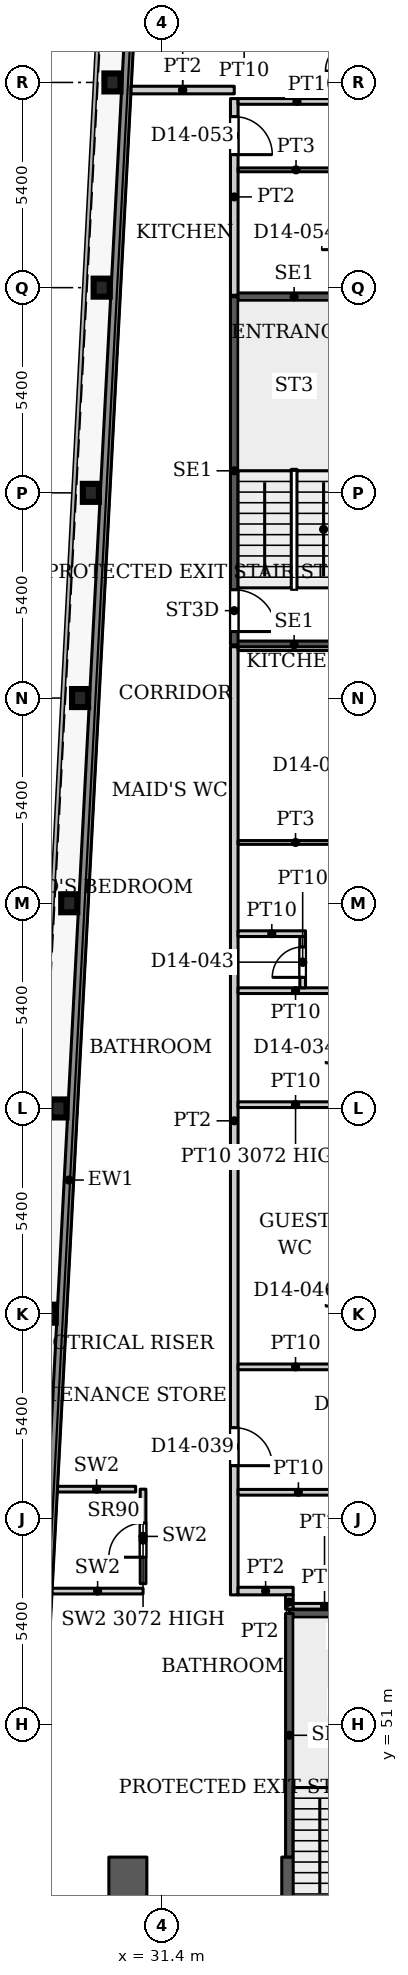
"""IFC4 building model, lengths in metres.
Left out: names, types, materials, properties, quantities, classifications, styles, units other than length and angle.
Written with IfcOpenShell. Run it as: python <this file> out.ifc"""

import sys

from ifc_helpers import new_model, si_unit, direction, frame, frame_2d, origin, origin_2d, place, context, subcontext, project, spatial, rectangle, i_section, extrude, source, transform, mapped, element, fill, save


model = new_model("IFC4")
c1 = context("Model", 3, precision=1e-05, world=origin(), true_north=direction((0.0, 1.0)))
c2 = subcontext(c1, "Body", "Model", "MODEL_VIEW")
j1 = project(units=[si_unit("LENGTHUNIT", "METRE"), si_unit("PLANEANGLEUNIT", "RADIAN")], contexts=[c1])
p1 = place(None, origin())
s1 = spatial("IfcSite", under=j1, at=p1, CompositionType="ELEMENT")
p2 = place(p1, origin())
s2 = spatial("IfcBuilding", under=s1, at=p2, CompositionType="ELEMENT")
p3 = place(p2, frame((0.0, 0.0, 65.6)))
s3 = spatial("IfcBuildingStorey", under=s2, at=p3, CompositionType="ELEMENT", Elevation=65.6)
for number, where, z_axis, x_axis in (
    (1, (28.39, 61.8, 0.0), (0.0, 0.0, 1.0), (1.0, 0.0, 0.0)),
    (2, (28.674, 67.2, 0.0), (0.0, 0.0, 1.0), (1.0, 0.0, 0.0)),
    (3, (28.958, 72.6, 0.0), (0.0, 0.0, 1.0), (1.0, 0.0, 0.0)),
    (4, (29.243, 78.0, 0.0), (0.0, 0.0, 1.0), (1.0, 0.0, 0.0)),
    (5, (29.527, 83.4, 0.0), (0.0, 0.0, 1.0), (1.0, 0.0, 0.0)),
    (6, (29.811, 88.8, 0.0), (0.0, 0.0, 1.0), (1.0, 0.0, 0.0)),
    (7, (30.095, 94.2, 0.0), (0.0, 0.0, 1.0), (1.0, 0.0, 0.0)),
):
    element("IfcColumn", number, at=place(p3, frame(where, z_axis=z_axis, x_axis=x_axis)), inside=s3, PredefinedType="COLUMN", context=c2, shape_type="SweptSolid", body=[
        extrude(i_section(OverallWidth=0.424, OverallDepth=0.474, WebThickness=0.048, FlangeThickness=0.077, FilletRadius=0.014, at=origin_2d()), origin(), (0.0, 0.0, 1.0), 3.9),
    ])
p4 = place(p3, frame((34.75, 29.05, 0.0), z_axis=(0.0, 0.0, 1.0), x_axis=(0.0, 1.0, 0.0)))
e8 = element("IfcWall", 8, at=p4, inside=s3, PredefinedType="SHEAR", context=c2, shape_type="SweptSolid", body=[
    extrude(rectangle(XDim=18.45, YDim=0.4, at=frame_2d((9.225, 0.0))), origin(), (0.0, 0.0, 1.0), 3.9),
])
p5 = place(p4, frame((8.025, 0.0, 0.0)))
e9 = element("IfcOpeningElement", 9, at=p5, cuts=e8, PredefinedType="OPENING", context=c2, shape_type="SweptSolid", body=[
    extrude(rectangle(XDim=1.1, YDim=2.2, at=frame_2d((0.55, 1.1))), frame((0.0, 0.21, 0.0), z_axis=(0.0, -1.0, 0.0), x_axis=(1.0, 0.0, 0.0)), (0.0, 0.0, 1.0), 0.42),
])
p6 = place(p4, frame((10.875, 0.0, 0.0)))
e10 = element("IfcOpeningElement", 10, at=p6, cuts=e8, PredefinedType="OPENING", context=c2, shape_type="SweptSolid", body=[
    extrude(rectangle(XDim=1.1, YDim=2.2, at=frame_2d((0.55, 1.1))), frame((0.0, 0.21, 0.0), z_axis=(0.0, -1.0, 0.0), x_axis=(1.0, 0.0, 0.0)), (0.0, 0.0, 1.0), 0.42),
])
p7 = place(p4, frame((13.725, 0.0, 0.0)))
e11 = element("IfcOpeningElement", 11, at=p7, cuts=e8, PredefinedType="OPENING", context=c2, shape_type="SweptSolid", body=[
    extrude(rectangle(XDim=1.1, YDim=2.2, at=frame_2d((0.55, 1.1))), frame((0.0, 0.21, 0.0), z_axis=(0.0, -1.0, 0.0), x_axis=(1.0, 0.0, 0.0)), (0.0, 0.0, 1.0), 0.42),
])
p8 = place(p4, frame((15.95, 0.0, 0.0)))
e12 = element("IfcOpeningElement", 12, at=p8, cuts=e8, PredefinedType="OPENING", context=c2, shape_type="SweptSolid", body=[
    extrude(rectangle(XDim=1.1, YDim=2.2, at=frame_2d((0.55, 1.1))), frame((0.0, 0.21, 0.0), z_axis=(0.0, -1.0, 0.0), x_axis=(1.0, 0.0, 0.0)), (0.0, 0.0, 1.0), 0.42),
])
p9 = place(p3, frame((30.5, 29.05, 0.0), z_axis=(0.0, 0.0, 1.0), x_axis=(0.0, 1.0, 0.0)))
e13 = element("IfcWall", 13, at=p9, inside=s3, PredefinedType="SHEAR", context=c2, shape_type="SweptSolid", body=[
    extrude(rectangle(XDim=18.45, YDim=1.0, at=frame_2d((9.225, 0.0))), origin(), (0.0, 0.0, 1.0), 3.9),
])
p10 = place(p9, frame((1.147, 0.0, 0.0)))
e14 = element("IfcOpeningElement", 14, at=p10, cuts=e13, PredefinedType="OPENING", context=c2, shape_type="SweptSolid", body=[
    extrude(rectangle(XDim=0.9, YDim=2.2, at=frame_2d((0.45, 1.1))), frame((0.0, 0.51, 0.0), z_axis=(0.0, -1.0, 0.0), x_axis=(1.0, 0.0, 0.0)), (0.0, 0.0, 1.0), 1.02),
])
p11 = place(p9, frame((7.925, 0.0, 0.0)))
e15 = element("IfcOpeningElement", 15, at=p11, cuts=e13, PredefinedType="OPENING", context=c2, shape_type="SweptSolid", body=[
    extrude(rectangle(XDim=0.9, YDim=2.2, at=frame_2d((0.45, 1.1))), frame((0.0, 0.51, 0.0), z_axis=(0.0, -1.0, 0.0), x_axis=(1.0, 0.0, 0.0)), (0.0, 0.0, 1.0), 1.02),
])
p12 = place(p3, frame((27.195, 31.969, 0.0), z_axis=(0.0, 0.0, 1.0), x_axis=(0.052554995867, 0.998618031286, 0.0)))
e16 = element("IfcWall", 16, at=p12, inside=s3, PredefinedType="SOLIDWALL", context=c2, shape_type="SweptSolid", body=[
    extrude(rectangle(XDim=66.787, YDim=0.25, at=frame_2d((33.394, 0.0))), origin(), (0.0, 0.0, 1.0), 3.75),
])
p13 = place(p3, frame((34.75, 53.91, 0.0), z_axis=(0.0, 0.0, 1.0), x_axis=(1.0, 0.0, 0.0)))
e17 = element("IfcWall", 17, at=p13, inside=s3, PredefinedType="SHEAR", context=c2, shape_type="SweptSolid", body=[
    extrude(rectangle(XDim=3.15, YDim=0.2, at=frame_2d((1.575, 0.0))), origin(), (0.0, 0.0, 1.0), 3.9),
])
p14 = place(p3, frame((34.75, 47.5, 0.0), z_axis=(0.0, 0.0, 1.0), x_axis=(0.0, 1.0, 0.0)))
e18 = element("IfcWall", 18, at=p14, inside=s3, PredefinedType="SHEAR", context=c2, shape_type="SweptSolid", body=[
    extrude(rectangle(XDim=6.41, YDim=0.2, at=frame_2d((3.205, 0.0))), origin(), (0.0, 0.0, 1.0), 3.9),
])
for number, where, z_axis, x_axis in (
    (19, (33.3, 79.4, 0.0), (0.0, 0.0, 1.0), (1.0, 0.0, 0.0)),
    (20, (33.3, 88.56, 0.0), (0.0, 0.0, 1.0), (1.0, 0.0, 0.0)),
):
    element("IfcWall", number, at=place(p3, frame(where, z_axis=z_axis, x_axis=x_axis)), inside=s3, PredefinedType="SHEAR", context=c2, shape_type="SweptSolid", body=[
        extrude(rectangle(XDim=3.15, YDim=0.2, at=frame_2d((1.575, 0.0))), origin(), (0.0, 0.0, 1.0), 3.9),
    ])
p15 = place(p3, frame((33.3, 79.4, 0.0), z_axis=(0.0, 0.0, 1.0), x_axis=(0.0, 1.0, 0.0)))
e21 = element("IfcWall", 21, at=p15, inside=s3, PredefinedType="SHEAR", context=c2, shape_type="SweptSolid", body=[
    extrude(rectangle(XDim=9.16, YDim=0.2, at=frame_2d((4.58, 0.0))), origin(), (0.0, 0.0, 1.0), 3.9),
])
p16 = place(p15, frame((0.35, 0.0, 0.0)))
e22 = element("IfcOpeningElement", 22, at=p16, cuts=e21, PredefinedType="OPENING", context=c2, shape_type="SweptSolid", body=[
    extrude(rectangle(XDim=1.1, YDim=2.2, at=frame_2d((0.55, 1.1))), frame((0.0, 0.11, 0.0), z_axis=(0.0, -1.0, 0.0), x_axis=(1.0, 0.0, 0.0)), (0.0, 0.0, 1.0), 0.22),
])
p17 = place(p3, frame((28.508, 54.5, 0.0), z_axis=(0.0, 0.0, 1.0), x_axis=(1.0, 0.0, 0.0)))
e23 = element("IfcWall", 23, at=p17, inside=s3, PredefinedType="PARTITIONING", context=c2, shape_type="SweptSolid", body=[
    extrude(rectangle(XDim=2.392, YDim=0.15, at=frame_2d((1.196, 0.0))), origin(), (0.0, 0.0, 1.0), 3.9),
])
p18 = place(p3, frame((30.9, 54.695, 0.0), z_axis=(0.0, 0.0, 1.0), x_axis=(0.0, 1.0, 0.0)))
e24 = element("IfcWall", 24, at=p18, inside=s3, PredefinedType="PARTITIONING", context=c2, shape_type="SweptSolid", body=[
    extrude(rectangle(XDim=2.487, YDim=0.15, at=frame_2d((1.243, 0.0))), origin(), (0.0, 0.0, 1.0), 3.072),
])
p19 = place(p18, frame((0.696, 0.0, 0.0)))
e25 = element("IfcOpeningElement", 25, at=p19, cuts=e24, PredefinedType="OPENING", context=c2, shape_type="SweptSolid", body=[
    extrude(rectangle(XDim=0.9, YDim=2.2, at=frame_2d((0.45, 1.1))), frame((0.0, 0.085, 0.0), z_axis=(0.0, -1.0, 0.0), x_axis=(1.0, 0.0, 0.0)), (0.0, 0.0, 1.0), 0.17),
])
p20 = place(p3, frame((28.649, 57.182, 0.0), z_axis=(0.0, 0.0, 1.0), x_axis=(1.0, 0.0, 0.0)))
e26 = element("IfcWall", 26, at=p20, inside=s3, PredefinedType="PARTITIONING", context=c2, shape_type="SweptSolid", body=[
    extrude(rectangle(XDim=2.056, YDim=0.15, at=frame_2d((1.028, 0.0))), origin(), (0.0, 0.0, 1.0), 3.9),
])
p21 = place(p3, frame((30.585, 94.0, 0.0), z_axis=(0.0, 0.0, 1.0), x_axis=(1.0, 0.0, 0.0)))
e27 = element("IfcWall", 27, at=p21, inside=s3, PredefinedType="PARTITIONING", context=c2, shape_type="SweptSolid", body=[
    extrude(rectangle(XDim=2.715, YDim=0.2, at=frame_2d((1.358, 0.0))), origin(), (0.0, 0.0, 1.0), 3.147),
])
p22 = place(p3, frame((33.3, 54.4, 0.0), z_axis=(0.0, 0.0, 1.0), x_axis=(0.0, 1.0, 0.0)))
e28 = element("IfcWall", 28, at=p22, inside=s3, PredefinedType="PARTITIONING", context=c2, shape_type="SweptSolid", body=[
    extrude(rectangle(XDim=24.95, YDim=0.2, at=frame_2d((12.475, 0.0))), origin(), (0.0, 0.0, 1.0), 3.6),
])
p23 = place(p22, frame((3.4, 0.0, 0.0)))
e29 = element("IfcOpeningElement", 29, at=p23, cuts=e28, PredefinedType="OPENING", context=c2, shape_type="SweptSolid", body=[
    extrude(rectangle(XDim=1.0, YDim=2.1, at=frame_2d((0.5, 1.05))), frame((0.0, 0.11, 0.0), z_axis=(0.0, -1.0, 0.0), x_axis=(1.0, 0.0, 0.0)), (0.0, 0.0, 1.0), 0.22),
])
p24 = place(p3, frame((33.3, 88.6, 0.0), z_axis=(0.0, 0.0, 1.0), x_axis=(0.0, 1.0, 0.0)))
e30 = element("IfcWall", 30, at=p24, inside=s3, PredefinedType="PARTITIONING", context=c2, shape_type="SweptSolid", body=[
    extrude(rectangle(XDim=5.175, YDim=0.2, at=frame_2d((2.587, 0.0))), origin(), (0.0, 0.0, 1.0), 3.6),
])
p25 = place(p24, frame((3.7, 0.0, 0.0)))
e31 = element("IfcOpeningElement", 31, at=p25, cuts=e30, PredefinedType="OPENING", context=c2, shape_type="SweptSolid", body=[
    extrude(rectangle(XDim=1.0, YDim=2.1, at=frame_2d((0.5, 1.05))), frame((0.0, 0.11, 0.0), z_axis=(0.0, -1.0, 0.0), x_axis=(1.0, 0.0, 0.0)), (0.0, 0.0, 1.0), 0.22),
])
p26 = place(p3, frame((33.4, 54.5, 0.0), z_axis=(0.0, 0.0, 1.0), x_axis=(1.0, 0.0, 0.0)))
e32 = element("IfcWall", 32, at=p26, inside=s3, PredefinedType="PARTITIONING", context=c2, shape_type="SweptSolid", body=[
    extrude(rectangle(XDim=1.45, YDim=0.2, at=frame_2d((0.725, 0.0))), origin(), (0.0, 0.0, 1.0), 3.6),
])
p27 = place(p3, frame((33.4, 57.1, 0.0), z_axis=(0.0, 0.0, 1.0), x_axis=(1.0, 0.0, 0.0)))
e33 = element("IfcWall", 33, at=p27, inside=s3, PredefinedType="PARTITIONING", context=c2, shape_type="SweptSolid", body=[
    extrude(rectangle(XDim=3.175, YDim=0.15, at=frame_2d((1.587, 0.0))), origin(), (0.0, 0.0, 1.0), 3.6),
])
p28 = place(p3, frame((33.4, 60.4, 0.0), z_axis=(0.0, 0.0, 1.0), x_axis=(1.0, 0.0, 0.0)))
e34 = element("IfcWall", 34, at=p28, inside=s3, PredefinedType="PARTITIONING", context=c2, shape_type="SweptSolid", body=[
    extrude(rectangle(XDim=3.025, YDim=0.15, at=frame_2d((1.513, 0.0))), origin(), (0.0, 0.0, 1.0), 3.6),
])
p29 = place(p3, frame((33.4, 67.3, 0.0), z_axis=(0.0, 0.0, 1.0), x_axis=(1.0, 0.0, 0.0)))
e35 = element("IfcWall", 35, at=p29, inside=s3, PredefinedType="PARTITIONING", context=c2, shape_type="SweptSolid", body=[
    extrude(rectangle(XDim=3.025, YDim=0.15, at=frame_2d((1.513, 0.0))), origin(), (0.0, 0.0, 1.0), 3.072),
])
p30 = place(p3, frame((33.4, 70.3, 0.0), z_axis=(0.0, 0.0, 1.0), x_axis=(1.0, 0.0, 0.0)))
e36 = element("IfcWall", 36, at=p30, inside=s3, PredefinedType="PARTITIONING", context=c2, shape_type="SweptSolid", body=[
    extrude(rectangle(XDim=3.025, YDim=0.15, at=frame_2d((1.513, 0.0))), origin(), (0.0, 0.0, 1.0), 3.6),
])
p31 = place(p3, frame((33.4, 71.8, 0.0), z_axis=(0.0, 0.0, 1.0), x_axis=(1.0, 0.0, 0.0)))
e37 = element("IfcWall", 37, at=p31, inside=s3, PredefinedType="PARTITIONING", context=c2, shape_type="SweptSolid", body=[
    extrude(rectangle(XDim=1.775, YDim=0.15, at=frame_2d((0.888, 0.0))), origin(), (0.0, 0.0, 1.0), 3.6),
])
p32 = place(p3, frame((33.4, 74.2, 0.0), z_axis=(0.0, 0.0, 1.0), x_axis=(1.0, 0.0, 0.0)))
e38 = element("IfcWall", 38, at=p32, inside=s3, PredefinedType="PARTITIONING", context=c2, shape_type="SweptSolid", body=[
    extrude(rectangle(XDim=3.025, YDim=0.1, at=frame_2d((1.513, 0.0))), origin(), (0.0, 0.0, 1.0), 3.6),
])
p33 = place(p3, frame((33.4, 79.3, 0.0), z_axis=(0.0, 0.0, 1.0), x_axis=(1.0, 0.0, 0.0)))
e39 = element("IfcWall", 39, at=p33, inside=s3, PredefinedType="PARTITIONING", context=c2, shape_type="SweptSolid", body=[
    extrude(rectangle(XDim=12.5, YDim=0.1, at=frame_2d((6.25, 0.0))), origin(), (0.0, 0.0, 1.0), 3.6),
])
p34 = place(p33, frame((3.355, 0.0, 0.0)))
e40 = element("IfcOpeningElement", 40, at=p34, cuts=e39, PredefinedType="OPENING", context=c2, shape_type="SweptSolid", body=[
    extrude(rectangle(XDim=0.9, YDim=2.1, at=frame_2d((0.45, 1.05))), frame((0.0, 0.06, 0.0), z_axis=(0.0, -1.0, 0.0), x_axis=(1.0, 0.0, 0.0)), (0.0, 0.0, 1.0), 0.12),
])
p35 = place(p3, frame((33.4, 91.9, 0.0), z_axis=(0.0, 0.0, 1.0), x_axis=(1.0, 0.0, 0.0)))
e41 = element("IfcWall", 41, at=p35, inside=s3, PredefinedType="PARTITIONING", context=c2, shape_type="SweptSolid", body=[
    extrude(rectangle(XDim=3.05, YDim=0.1, at=frame_2d((1.525, 0.0))), origin(), (0.0, 0.0, 1.0), 3.6),
])
p36 = place(p3, frame((33.4, 93.7, 0.0), z_axis=(0.0, 0.0, 1.0), x_axis=(1.0, 0.0, 0.0)))
e42 = element("IfcWall", 42, at=p36, inside=s3, PredefinedType="PARTITIONING", context=c2, shape_type="SweptSolid", body=[
    extrude(rectangle(XDim=3.1, YDim=0.15, at=frame_2d((1.55, 0.0))), origin(), (0.0, 0.0, 1.0), 3.6),
])
p37 = place(p3, frame((34.75, 54.025, 0.0), z_axis=(0.0, 0.0, 1.0), x_axis=(0.0, 1.0, 0.0)))
e43 = element("IfcWall", 43, at=p37, inside=s3, PredefinedType="PARTITIONING", context=c2, shape_type="SweptSolid", body=[
    extrude(rectangle(XDim=0.375, YDim=0.2, at=frame_2d((0.188, 0.0))), origin(), (0.0, 0.0, 1.0), 3.6),
])
p38 = place(p3, frame((34.85, 54.1, 0.0), z_axis=(0.0, 0.0, 1.0), x_axis=(1.0, 0.0, 0.0)))
e44 = element("IfcWall", 44, at=p38, inside=s3, PredefinedType="PARTITIONING", context=c2, shape_type="SweptSolid", body=[
    extrude(rectangle(XDim=1.65, YDim=0.15, at=frame_2d((0.825, 0.0))), origin(), (0.0, 0.0, 1.0), 3.6),
])
p39 = place(p3, frame((35.1, 70.375, 0.0), z_axis=(0.0, 0.0, 1.0), x_axis=(0.0, 1.0, 0.0)))
e45 = element("IfcWall", 45, at=p39, inside=s3, PredefinedType="PARTITIONING", context=c2, shape_type="SweptSolid", body=[
    extrude(rectangle(XDim=1.35, YDim=0.15, at=frame_2d((0.675, 0.0))), origin(), (0.0, 0.0, 1.0), 3.6),
])
p40 = place(p39, frame((0.275, 0.0, 0.0)))
e46 = element("IfcOpeningElement", 46, at=p40, cuts=e45, PredefinedType="OPENING", context=c2, shape_type="SweptSolid", body=[
    extrude(rectangle(XDim=0.8, YDim=2.1, at=frame_2d((0.4, 1.05))), frame((0.0, 0.085, 0.0), z_axis=(0.0, -1.0, 0.0), x_axis=(1.0, 0.0, 0.0)), (0.0, 0.0, 1.0), 0.17),
])
m1 = source(origin(), c2, "Body", "SweptSolid", [
    extrude(rectangle(XDim=0.9, YDim=2.2, at=frame_2d((0.45, 1.1))), frame((0.0, 0.025, 0.0), z_axis=(0.0, -1.0, 0.0), x_axis=(1.0, 0.0, 0.0)), (0.0, 0.0, 1.0), 0.05),
])
p41 = place(p19, origin())
e47 = element("IfcDoor", 47, at=p41, inside=s3, OperationType="SINGLE_SWING_LEFT", PredefinedType="DOOR", context=c2, shape_type="MappedRepresentation", body=[
    mapped(m1, transform((0.0, 0.0, 0.0), x_axis=(1.0, 0.0, 0.0), y_axis=(0.0, 1.0, 0.0), z_axis=(0.0, 0.0, 1.0), scale=1.0)),
])
fill(e25, e47)
m2 = source(origin(), c2, "Body", "SweptSolid", [
    extrude(rectangle(XDim=1.1, YDim=2.2, at=frame_2d((0.55, 1.1))), frame((0.0, 0.025, 0.0), z_axis=(0.0, -1.0, 0.0), x_axis=(1.0, 0.0, 0.0)), (0.0, 0.0, 1.0), 0.05),
])
p42 = place(p16, origin())
e48 = element("IfcDoor", 48, at=p42, inside=s3, OperationType="SINGLE_SWING_RIGHT", PredefinedType="DOOR", context=c2, shape_type="MappedRepresentation", body=[
    mapped(m2, transform((0.0, 0.0, 0.0), x_axis=(1.0, 0.0, 0.0), y_axis=(0.0, 1.0, 0.0), z_axis=(0.0, 0.0, 1.0), scale=1.0)),
])
fill(e22, e48)
m3 = source(origin(), c2, "Body", "SweptSolid", [
    extrude(rectangle(XDim=1.0, YDim=2.1, at=frame_2d((0.5, 1.05))), frame((0.0, 0.025, 0.0), z_axis=(0.0, -1.0, 0.0), x_axis=(1.0, 0.0, 0.0)), (0.0, 0.0, 1.0), 0.05),
])
p43 = place(p23, origin())
e49 = element("IfcDoor", 49, at=p43, inside=s3, OperationType="SINGLE_SWING_RIGHT", PredefinedType="DOOR", context=c2, shape_type="MappedRepresentation", body=[
    mapped(m3, transform((0.0, 0.0, 0.0), x_axis=(1.0, 0.0, 0.0), y_axis=(0.0, 1.0, 0.0), z_axis=(0.0, 0.0, 1.0), scale=1.0)),
])
fill(e29, e49)
m4 = source(origin(), c2, "Body", "SweptSolid", [
    extrude(rectangle(XDim=0.8, YDim=2.1, at=frame_2d((0.4, 1.05))), frame((0.0, 0.025, 0.0), z_axis=(0.0, -1.0, 0.0), x_axis=(1.0, 0.0, 0.0)), (0.0, 0.0, 1.0), 0.05),
])
p44 = place(p40, origin())
e50 = element("IfcDoor", 50, at=p44, inside=s3, OperationType="SINGLE_SWING_LEFT", PredefinedType="DOOR", context=c2, shape_type="MappedRepresentation", body=[
    mapped(m4, transform((0.0, 0.0, 0.0), x_axis=(1.0, 0.0, 0.0), y_axis=(0.0, 1.0, 0.0), z_axis=(0.0, 0.0, 1.0), scale=1.0)),
])
fill(e46, e50)
p45 = place(p25, origin())
e51 = element("IfcDoor", 51, at=p45, inside=s3, OperationType="SINGLE_SWING_RIGHT", PredefinedType="DOOR", context=c2, shape_type="MappedRepresentation", body=[
    mapped(m3, transform((0.0, 0.0, 0.0), x_axis=(1.0, 0.0, 0.0), y_axis=(0.0, 1.0, 0.0), z_axis=(0.0, 0.0, 1.0), scale=1.0)),
])
fill(e31, e51)
save(model, sys.argv[1])
